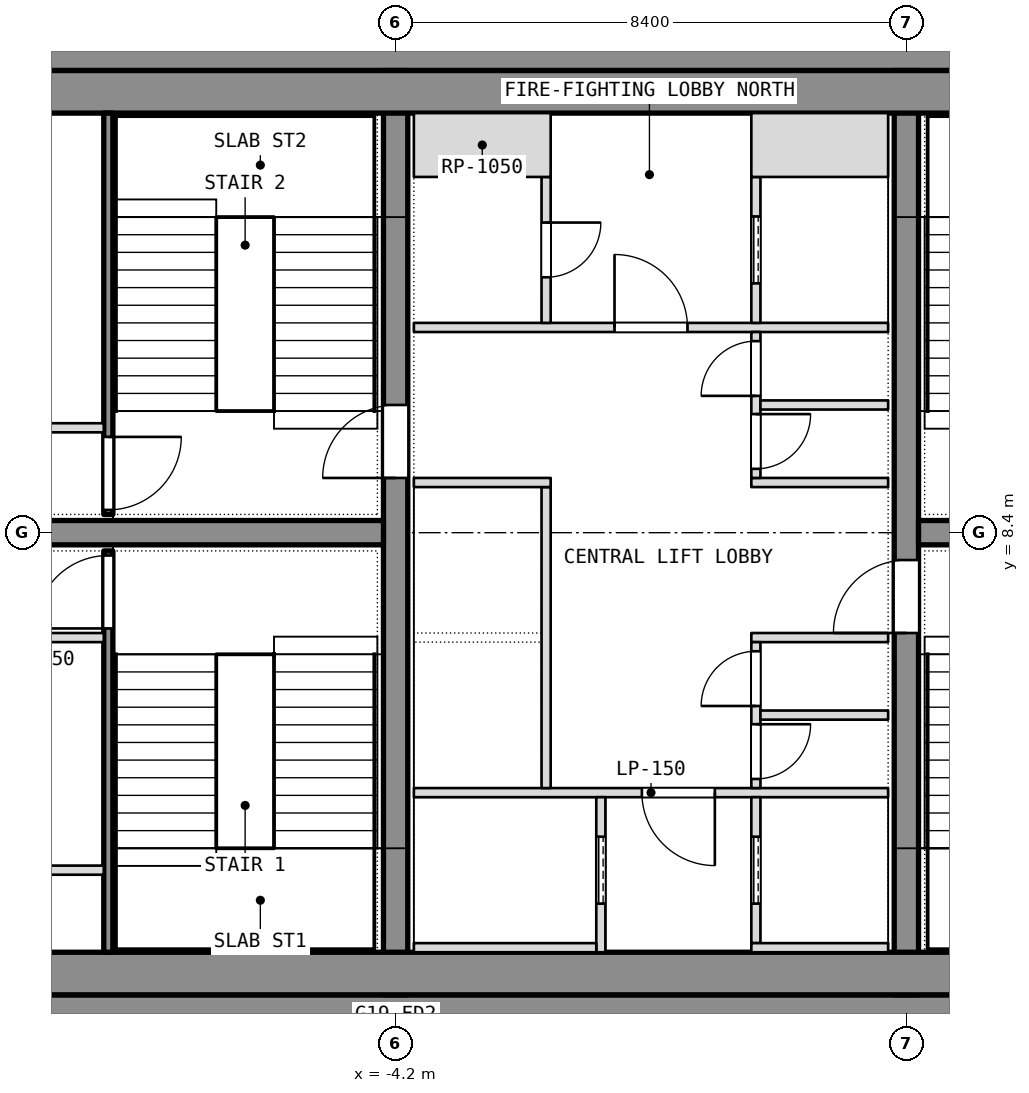
"""IFC4 building model, lengths in metres.
Left out: names, types, materials, properties, quantities, classifications, styles, units other than length and angle.
Written with IfcOpenShell. Run it as: python <this file> out.ifc"""

import sys

from ifc_helpers import new_model, si_unit, direction, frame, frame_2d, origin, place, context, subcontext, project, spatial, rectangle, extrude, element, fill, save


model = new_model("IFC4")
c1 = context("Model", 3, precision=1e-05, world=origin(), true_north=direction((0.0, 1.0)))
c2 = subcontext(c1, "Body", "Model", "MODEL_VIEW")
j1 = project(units=[si_unit("LENGTHUNIT", "METRE"), si_unit("PLANEANGLEUNIT", "RADIAN")], contexts=[c1])
p1 = place(None, origin())
s1 = spatial("IfcSite", under=j1, at=p1, CompositionType="ELEMENT")
p2 = place(p1, origin())
s2 = spatial("IfcBuilding", under=s1, at=p2, CompositionType="ELEMENT")
p3 = place(p2, frame((0.0, 0.0, 227.3)))
s3 = spatial("IfcBuildingStorey", under=s2, at=p3, CompositionType="ELEMENT", Elevation=227.3)
for number, where, z_axis, x_axis in (
    (1, (-11.1, 0.4, 0.0), (0.0, 0.0, 1.0), (1.0, 0.0, 0.0)),
    (2, (-11.1, 16.4, 0.0), (0.0, 0.0, 1.0), (1.0, 0.0, 0.0)),
):
    element("IfcWall", number, at=place(p3, frame(where, z_axis=z_axis, x_axis=x_axis)), inside=s3, PredefinedType="SHEAR", context=c2, shape_type="SweptSolid", body=[
        extrude(rectangle(XDim=22.2, YDim=0.8, at=frame_2d((11.1, 0.0))), origin(), (0.0, 0.0, 1.0), 3.6),
    ])
p4 = place(p3, frame((-4.2, 0.8, 0.0), z_axis=(0.0, 0.0, 1.0), x_axis=(0.0, 1.0, 0.0)))
e3 = element("IfcWall", 3, at=p4, inside=s3, PredefinedType="SHEAR", context=c2, shape_type="SweptSolid", body=[
    extrude(rectangle(XDim=15.2, YDim=0.4, at=frame_2d((7.6, 0.0))), origin(), (0.0, 0.0, 1.0), 3.6),
])
p5 = place(p4, frame((8.5, 0.0, 0.0)))
e4 = element("IfcOpeningElement", 4, at=p5, cuts=e3, PredefinedType="OPENING", context=c2, shape_type="SweptSolid", body=[
    extrude(rectangle(XDim=1.2, YDim=2.1, at=frame_2d((0.6, 1.05))), frame((0.0, 0.2, 0.0), z_axis=(0.0, -1.0, 0.0), x_axis=(1.0, 0.0, 0.0)), (0.0, 0.0, 1.0), 0.4),
])
p6 = place(p3, frame((4.2, 0.8, 0.0), z_axis=(0.0, 0.0, 1.0), x_axis=(0.0, 1.0, 0.0)))
e5 = element("IfcWall", 5, at=p6, inside=s3, PredefinedType="SHEAR", context=c2, shape_type="SweptSolid", body=[
    extrude(rectangle(XDim=15.2, YDim=0.4, at=frame_2d((7.6, 0.0))), origin(), (0.0, 0.0, 1.0), 3.6),
])
p7 = place(p6, frame((5.95, 0.0, 0.0)))
e6 = element("IfcOpeningElement", 6, at=p7, cuts=e5, PredefinedType="OPENING", context=c2, shape_type="SweptSolid", body=[
    extrude(rectangle(XDim=1.2, YDim=2.1, at=frame_2d((0.6, 1.05))), frame((0.0, 0.2, 0.0), z_axis=(0.0, -1.0, 0.0), x_axis=(1.0, 0.0, 0.0)), (0.0, 0.0, 1.0), 0.4),
])
for number, where, z_axis, x_axis in (
    (7, (-11.1, 8.4, 0.0), (0.0, 0.0, 1.0), (1.0, 0.0, 0.0)),
    (8, (4.4, 8.4, 0.0), (0.0, 0.0, 1.0), (1.0, 0.0, 0.0)),
):
    element("IfcWall", number, at=place(p3, frame(where, z_axis=z_axis, x_axis=x_axis)), inside=s3, PredefinedType="SHEAR", context=c2, shape_type="SweptSolid", body=[
        extrude(rectangle(XDim=6.7, YDim=0.4, at=frame_2d((3.35, 0.0))), origin(), (0.0, 0.0, 1.0), 3.6),
    ])
for number, where, z_axis, x_axis in (
    (9, (-11.1, 1.15, 0.0), (0.0, 0.0, 1.0), (1.0, 0.0, 0.0)),
    (10, (-11.1, 15.65, 0.0), (0.0, 0.0, 1.0), (1.0, 0.0, 0.0)),
):
    element("IfcWall", number, at=place(p3, frame(where, z_axis=z_axis, x_axis=x_axis)), inside=s3, PredefinedType="PARTITIONING", context=c2, shape_type="SweptSolid", body=[
        extrude(rectangle(XDim=22.2, YDim=0.7, at=frame_2d((11.1, 0.0))), origin(), (0.0, 0.0, 1.0), 3.34),
    ])
p8 = place(p3, frame((-8.925, 1.5, 0.0), z_axis=(0.0, 0.0, 1.0), x_axis=(0.0, 1.0, 0.0)))
e11 = element("IfcWall", 11, at=p8, inside=s3, PredefinedType="SHEAR", context=c2, shape_type="SweptSolid", body=[
    extrude(rectangle(XDim=6.6, YDim=0.15, at=frame_2d((3.3, 0.0))), origin(), (0.0, 0.0, 1.0), 3.34),
])
p9 = place(p8, frame((5.325, 0.0, 0.0)))
e12 = element("IfcOpeningElement", 12, at=p9, cuts=e11, PredefinedType="OPENING", context=c2, shape_type="SweptSolid", body=[
    extrude(rectangle(XDim=1.2, YDim=2.1, at=frame_2d((0.6, 1.05))), frame((0.0, 0.075, 0.0), z_axis=(0.0, -1.0, 0.0), x_axis=(1.0, 0.0, 0.0)), (0.0, 0.0, 1.0), 0.15),
])
for number, where, z_axis, x_axis in (
    (13, (-11.1, 6.675, 0.0), (0.0, 0.0, 1.0), (1.0, 0.0, 0.0)),
    (14, (-11.1, 2.85, 0.0), (0.0, 0.0, 1.0), (1.0, 0.0, 0.0)),
):
    element("IfcWall", number, at=place(p3, frame(where, z_axis=z_axis, x_axis=x_axis)), inside=s3, PredefinedType="PARTITIONING", context=c2, shape_type="SweptSolid", body=[
        extrude(rectangle(XDim=2.1, YDim=0.15, at=frame_2d((1.05, 0.0))), origin(), (0.0, 0.0, 1.0), 3.34),
    ])
p10 = place(p3, frame((-8.925, 8.7, 0.0), z_axis=(0.0, 0.0, 1.0), x_axis=(0.0, 1.0, 0.0)))
e15 = element("IfcWall", 15, at=p10, inside=s3, PredefinedType="SHEAR", context=c2, shape_type="SweptSolid", body=[
    extrude(rectangle(XDim=6.6, YDim=0.15, at=frame_2d((3.3, 0.0))), origin(), (0.0, 0.0, 1.0), 3.34),
])
p11 = place(p10, frame((0.075, 0.0, 0.0)))
e16 = element("IfcOpeningElement", 16, at=p11, cuts=e15, PredefinedType="OPENING", context=c2, shape_type="SweptSolid", body=[
    extrude(rectangle(XDim=1.2, YDim=2.1, at=frame_2d((0.6, 1.05))), frame((0.0, 0.075, 0.0), z_axis=(0.0, -1.0, 0.0), x_axis=(1.0, 0.0, 0.0)), (0.0, 0.0, 1.0), 0.15),
])
p12 = place(p3, frame((-11.1, 10.125, 0.0), z_axis=(0.0, 0.0, 1.0), x_axis=(1.0, 0.0, 0.0)))
e17 = element("IfcWall", 17, at=p12, inside=s3, PredefinedType="PARTITIONING", context=c2, shape_type="SweptSolid", body=[
    extrude(rectangle(XDim=2.1, YDim=0.15, at=frame_2d((1.05, 0.0))), origin(), (0.0, 0.0, 1.0), 3.34),
])
p13 = place(p3, frame((-3.9, 4.125, 0.0), z_axis=(0.0, 0.0, 1.0), x_axis=(1.0, 0.0, 0.0)))
e18 = element("IfcWall", 18, at=p13, inside=s3, PredefinedType="PARTITIONING", context=c2, shape_type="SweptSolid", body=[
    extrude(rectangle(XDim=7.8, YDim=0.15, at=frame_2d((3.9, 0.0))), origin(), (0.0, 0.0, 1.0), 3.34),
])
p14 = place(p13, frame((3.75, 0.0, 0.0)))
e19 = element("IfcOpeningElement", 19, at=p14, cuts=e18, PredefinedType="OPENING", context=c2, shape_type="SweptSolid", body=[
    extrude(rectangle(XDim=1.2, YDim=2.1, at=frame_2d((0.6, 1.05))), frame((0.0, 0.075, 0.0), z_axis=(0.0, -1.0, 0.0), x_axis=(1.0, 0.0, 0.0)), (0.0, 0.0, 1.0), 0.15),
])
p15 = place(p3, frame((-3.9, 11.775, 0.0), z_axis=(0.0, 0.0, 1.0), x_axis=(1.0, 0.0, 0.0)))
e20 = element("IfcWall", 20, at=p15, inside=s3, PredefinedType="PARTITIONING", context=c2, shape_type="SweptSolid", body=[
    extrude(rectangle(XDim=7.8, YDim=0.15, at=frame_2d((3.9, 0.0))), origin(), (0.0, 0.0, 1.0), 3.34),
])
p16 = place(p15, frame((3.3, 0.0, 0.0)))
e21 = element("IfcOpeningElement", 21, at=p16, cuts=e20, PredefinedType="OPENING", context=c2, shape_type="SweptSolid", body=[
    extrude(rectangle(XDim=1.2, YDim=2.1, at=frame_2d((0.6, 1.05))), frame((0.0, 0.075, 0.0), z_axis=(0.0, -1.0, 0.0), x_axis=(1.0, 0.0, 0.0)), (0.0, 0.0, 1.0), 0.15),
])
p17 = place(p3, frame((-0.825, 1.5, 0.0), z_axis=(0.0, 0.0, 1.0), x_axis=(0.0, 1.0, 0.0)))
e22 = element("IfcWall", 22, at=p17, inside=s3, PredefinedType="SHEAR", context=c2, shape_type="SweptSolid", body=[
    extrude(rectangle(XDim=2.55, YDim=0.15, at=frame_2d((1.275, 0.0))), origin(), (0.0, 0.0, 1.0), 3.6),
])
p18 = place(p17, frame((0.8, 0.0, 0.0)))
e23 = element("IfcOpeningElement", 23, at=p18, cuts=e22, PredefinedType="OPENING", context=c2, shape_type="SweptSolid", body=[
    extrude(rectangle(XDim=1.1, YDim=2.1, at=frame_2d((0.55, 1.05))), frame((0.0, 0.075, 0.0), z_axis=(0.0, -1.0, 0.0), x_axis=(1.0, 0.0, 0.0)), (0.0, 0.0, 1.0), 0.15),
])
p19 = place(p3, frame((-3.9, 1.575, 0.0), z_axis=(0.0, 0.0, 1.0), x_axis=(1.0, 0.0, 0.0)))
e24 = element("IfcWall", 24, at=p19, inside=s3, PredefinedType="SHEAR", context=c2, shape_type="SweptSolid", body=[
    extrude(rectangle(XDim=3.0, YDim=0.15, at=frame_2d((1.5, 0.0))), origin(), (0.0, 0.0, 1.0), 3.6),
])
p20 = place(p3, frame((-1.725, 4.2, 0.0), z_axis=(0.0, 0.0, 1.0), x_axis=(0.0, 1.0, 0.0)))
e25 = element("IfcWall", 25, at=p20, inside=s3, PredefinedType="SHEAR", context=c2, shape_type="SweptSolid", body=[
    extrude(rectangle(XDim=4.95, YDim=0.15, at=frame_2d((2.475, 0.0))), origin(), (0.0, 0.0, 1.0), 3.6),
])
p21 = place(p3, frame((-3.9, 9.225, 0.0), z_axis=(0.0, 0.0, 1.0), x_axis=(1.0, 0.0, 0.0)))
e26 = element("IfcWall", 26, at=p21, inside=s3, PredefinedType="SHEAR", context=c2, shape_type="SweptSolid", body=[
    extrude(rectangle(XDim=2.25, YDim=0.15, at=frame_2d((1.125, 0.0))), origin(), (0.0, 0.0, 1.0), 3.6),
])
p22 = place(p3, frame((-1.725, 11.85, 0.0), z_axis=(0.0, 0.0, 1.0), x_axis=(0.0, 1.0, 0.0)))
e27 = element("IfcWall", 27, at=p22, inside=s3, PredefinedType="PARTITIONING", context=c2, shape_type="SweptSolid", body=[
    extrude(rectangle(XDim=2.4, YDim=0.15, at=frame_2d((1.2, 0.0))), origin(), (0.0, 0.0, 1.0), 3.34),
])
p23 = place(p22, frame((0.75, 0.0, 0.0)))
e28 = element("IfcOpeningElement", 28, at=p23, cuts=e27, PredefinedType="OPENING", context=c2, shape_type="SweptSolid", body=[
    extrude(rectangle(XDim=0.9, YDim=2.1, at=frame_2d((0.45, 1.05))), frame((0.0, 0.075, 0.0), z_axis=(0.0, -1.0, 0.0), x_axis=(1.0, 0.0, 0.0)), (0.0, 0.0, 1.0), 0.15),
])
p24 = place(p3, frame((-3.9, 14.775, 0.0), z_axis=(0.0, 0.0, 1.0), x_axis=(1.0, 0.0, 0.0)))
e29 = element("IfcWall", 29, at=p24, inside=s3, PredefinedType="PARTITIONING", context=c2, shape_type="SweptSolid", body=[
    extrude(rectangle(XDim=2.25, YDim=1.05, at=frame_2d((1.125, 0.0))), origin(), (0.0, 0.0, 1.0), 3.34),
])
p25 = place(p3, frame((1.725, 1.65, 0.0), z_axis=(0.0, 0.0, 1.0), x_axis=(0.0, 1.0, 0.0)))
e30 = element("IfcWall", 30, at=p25, inside=s3, PredefinedType="SHEAR", context=c2, shape_type="SweptSolid", body=[
    extrude(rectangle(XDim=2.4, YDim=0.15, at=frame_2d((1.2, 0.0))), origin(), (0.0, 0.0, 1.0), 3.6),
])
p26 = place(p25, frame((0.65, 0.0, 0.0)))
e31 = element("IfcOpeningElement", 31, at=p26, cuts=e30, PredefinedType="OPENING", context=c2, shape_type="SweptSolid", body=[
    extrude(rectangle(XDim=1.1, YDim=2.1, at=frame_2d((0.55, 1.05))), frame((0.0, 0.075, 0.0), z_axis=(0.0, -1.0, 0.0), x_axis=(1.0, 0.0, 0.0)), (0.0, 0.0, 1.0), 0.15),
])
p27 = place(p3, frame((1.65, 1.575, 0.0), z_axis=(0.0, 0.0, 1.0), x_axis=(1.0, 0.0, 0.0)))
e32 = element("IfcWall", 32, at=p27, inside=s3, PredefinedType="SHEAR", context=c2, shape_type="SweptSolid", body=[
    extrude(rectangle(XDim=2.25, YDim=0.15, at=frame_2d((1.125, 0.0))), origin(), (0.0, 0.0, 1.0), 3.6),
])
p28 = place(p3, frame((1.725, 11.85, 0.0), z_axis=(0.0, 0.0, 1.0), x_axis=(0.0, 1.0, 0.0)))
e33 = element("IfcWall", 33, at=p28, inside=s3, PredefinedType="SHEAR", context=c2, shape_type="SweptSolid", body=[
    extrude(rectangle(XDim=2.4, YDim=0.15, at=frame_2d((1.2, 0.0))), origin(), (0.0, 0.0, 1.0), 3.6),
])
p29 = place(p28, frame((0.65, 0.0, 0.0)))
e34 = element("IfcOpeningElement", 34, at=p29, cuts=e33, PredefinedType="OPENING", context=c2, shape_type="SweptSolid", body=[
    extrude(rectangle(XDim=1.1, YDim=2.1, at=frame_2d((0.55, 1.05))), frame((0.0, 0.075, 0.0), z_axis=(0.0, -1.0, 0.0), x_axis=(1.0, 0.0, 0.0)), (0.0, 0.0, 1.0), 0.15),
])
p30 = place(p3, frame((1.65, 14.775, 0.0), z_axis=(0.0, 0.0, 1.0), x_axis=(1.0, 0.0, 0.0)))
e35 = element("IfcWall", 35, at=p30, inside=s3, PredefinedType="SHEAR", context=c2, shape_type="SweptSolid", body=[
    extrude(rectangle(XDim=2.25, YDim=1.05, at=frame_2d((1.125, 0.0))), origin(), (0.0, 0.0, 1.0), 3.6),
])
for number, where, z_axis, x_axis in (
    (36, (1.65, 6.675, 0.0), (0.0, 0.0, 1.0), (1.0, 0.0, 0.0)),
    (37, (1.65, 9.225, 0.0), (0.0, 0.0, 1.0), (1.0, 0.0, 0.0)),
):
    element("IfcWall", number, at=place(p3, frame(where, z_axis=z_axis, x_axis=x_axis)), inside=s3, PredefinedType="PARTITIONING", context=c2, shape_type="SweptSolid", body=[
        extrude(rectangle(XDim=2.25, YDim=0.15, at=frame_2d((1.125, 0.0))), origin(), (0.0, 0.0, 1.0), 3.34),
    ])
p31 = place(p3, frame((1.725, 4.2, 0.0), z_axis=(0.0, 0.0, 1.0), x_axis=(0.0, 1.0, 0.0)))
e38 = element("IfcWall", 38, at=p31, inside=s3, PredefinedType="PARTITIONING", context=c2, shape_type="SweptSolid", body=[
    extrude(rectangle(XDim=2.4, YDim=0.15, at=frame_2d((1.2, 0.0))), origin(), (0.0, 0.0, 1.0), 3.34),
])
p32 = place(p31, frame((0.15, 0.0, 0.0)))
e39 = element("IfcOpeningElement", 39, at=p32, cuts=e38, PredefinedType="OPENING", context=c2, shape_type="SweptSolid", body=[
    extrude(rectangle(XDim=0.9, YDim=2.1, at=frame_2d((0.45, 1.05))), frame((0.0, 0.075, 0.0), z_axis=(0.0, -1.0, 0.0), x_axis=(1.0, 0.0, 0.0)), (0.0, 0.0, 1.0), 0.15),
])
p33 = place(p31, frame((1.35, 0.0, 0.0)))
e40 = element("IfcOpeningElement", 40, at=p33, cuts=e38, PredefinedType="OPENING", context=c2, shape_type="SweptSolid", body=[
    extrude(rectangle(XDim=0.9, YDim=2.1, at=frame_2d((0.45, 1.05))), frame((0.0, 0.075, 0.0), z_axis=(0.0, -1.0, 0.0), x_axis=(1.0, 0.0, 0.0)), (0.0, 0.0, 1.0), 0.15),
])
p34 = place(p3, frame((1.725, 9.3, 0.0), z_axis=(0.0, 0.0, 1.0), x_axis=(0.0, 1.0, 0.0)))
e41 = element("IfcWall", 41, at=p34, inside=s3, PredefinedType="PARTITIONING", context=c2, shape_type="SweptSolid", body=[
    extrude(rectangle(XDim=2.4, YDim=0.15, at=frame_2d((1.2, 0.0))), origin(), (0.0, 0.0, 1.0), 3.34),
])
p35 = place(p34, frame((0.15, 0.0, 0.0)))
e42 = element("IfcOpeningElement", 42, at=p35, cuts=e41, PredefinedType="OPENING", context=c2, shape_type="SweptSolid", body=[
    extrude(rectangle(XDim=0.9, YDim=2.1, at=frame_2d((0.45, 1.05))), frame((0.0, 0.075, 0.0), z_axis=(0.0, -1.0, 0.0), x_axis=(1.0, 0.0, 0.0)), (0.0, 0.0, 1.0), 0.15),
])
p36 = place(p34, frame((1.35, 0.0, 0.0)))
e43 = element("IfcOpeningElement", 43, at=p36, cuts=e41, PredefinedType="OPENING", context=c2, shape_type="SweptSolid", body=[
    extrude(rectangle(XDim=0.9, YDim=2.1, at=frame_2d((0.45, 1.05))), frame((0.0, 0.075, 0.0), z_axis=(0.0, -1.0, 0.0), x_axis=(1.0, 0.0, 0.0)), (0.0, 0.0, 1.0), 0.15),
])
for number, where, z_axis, x_axis in (
    (44, (1.8, 5.4, 0.0), (0.0, 0.0, 1.0), (1.0, 0.0, 0.0)),
    (45, (1.8, 10.5, 0.0), (0.0, 0.0, 1.0), (1.0, 0.0, 0.0)),
):
    element("IfcWall", number, at=place(p3, frame(where, z_axis=z_axis, x_axis=x_axis)), inside=s3, PredefinedType="PARTITIONING", context=c2, shape_type="SweptSolid", body=[
        extrude(rectangle(XDim=2.1, YDim=0.15, at=frame_2d((1.05, 0.0))), origin(), (0.0, 0.0, 1.0), 3.34),
    ])
p37 = place(p9, origin())
e46 = element("IfcDoor", 46, at=p37, inside=s3, OperationType="SINGLE_SWING_LEFT", PredefinedType="DOOR", context=c2, shape_type="SweptSolid", body=[
    extrude(rectangle(XDim=1.2, YDim=2.1, at=frame_2d((0.6, 1.05))), frame((0.0, 0.025, 0.0), z_axis=(0.0, -1.0, 0.0), x_axis=(1.0, 0.0, 0.0)), (0.0, 0.0, 1.0), 0.05),
])
fill(e12, e46)
p38 = place(p11, origin())
e47 = element("IfcDoor", 47, at=p38, inside=s3, OperationType="SINGLE_SWING_LEFT", PredefinedType="DOOR", context=c2, shape_type="SweptSolid", body=[
    extrude(rectangle(XDim=1.2, YDim=2.1, at=frame_2d((0.6, 1.05))), frame((0.0, 0.025, 0.0), z_axis=(0.0, -1.0, 0.0), x_axis=(1.0, 0.0, 0.0)), (0.0, 0.0, 1.0), 0.05),
])
fill(e16, e47)
p39 = place(p32, origin())
e48 = element("IfcDoor", 48, at=p39, inside=s3, OperationType="SINGLE_SWING_LEFT", PredefinedType="DOOR", context=c2, shape_type="SweptSolid", body=[
    extrude(rectangle(XDim=0.9, YDim=2.1, at=frame_2d((0.45, 1.05))), frame((0.0, 0.025, 0.0), z_axis=(0.0, -1.0, 0.0), x_axis=(1.0, 0.0, 0.0)), (0.0, 0.0, 1.0), 0.05),
])
fill(e39, e48)
p40 = place(p33, origin())
e49 = element("IfcDoor", 49, at=p40, inside=s3, OperationType="SINGLE_SWING_LEFT", PredefinedType="DOOR", context=c2, shape_type="SweptSolid", body=[
    extrude(rectangle(XDim=0.9, YDim=2.1, at=frame_2d((0.45, 1.05))), frame((0.0, 0.025, 0.0), z_axis=(0.0, -1.0, 0.0), x_axis=(1.0, 0.0, 0.0)), (0.0, 0.0, 1.0), 0.05),
])
fill(e40, e49)
p41 = place(p35, origin())
e50 = element("IfcDoor", 50, at=p41, inside=s3, OperationType="SINGLE_SWING_LEFT", PredefinedType="DOOR", context=c2, shape_type="SweptSolid", body=[
    extrude(rectangle(XDim=0.9, YDim=2.1, at=frame_2d((0.45, 1.05))), frame((0.0, 0.025, 0.0), z_axis=(0.0, -1.0, 0.0), x_axis=(1.0, 0.0, 0.0)), (0.0, 0.0, 1.0), 0.05),
])
fill(e42, e50)
p42 = place(p36, origin())
e51 = element("IfcDoor", 51, at=p42, inside=s3, OperationType="SINGLE_SWING_LEFT", PredefinedType="DOOR", context=c2, shape_type="SweptSolid", body=[
    extrude(rectangle(XDim=0.9, YDim=2.1, at=frame_2d((0.45, 1.05))), frame((0.0, 0.025, 0.0), z_axis=(0.0, -1.0, 0.0), x_axis=(1.0, 0.0, 0.0)), (0.0, 0.0, 1.0), 0.05),
])
fill(e43, e51)
p43 = place(p18, origin())
e52 = element("IfcDoor", 52, at=p43, inside=s3, OperationType="SLIDING_TO_LEFT", PredefinedType="DOOR", context=c2, shape_type="SweptSolid", body=[
    extrude(rectangle(XDim=1.1, YDim=2.1, at=frame_2d((0.55, 1.05))), frame((0.0, 0.025, 0.0), z_axis=(0.0, -1.0, 0.0), x_axis=(1.0, 0.0, 0.0)), (0.0, 0.0, 1.0), 0.05),
])
fill(e23, e52)
p44 = place(p26, origin())
e53 = element("IfcDoor", 53, at=p44, inside=s3, OperationType="SLIDING_TO_LEFT", PredefinedType="DOOR", context=c2, shape_type="SweptSolid", body=[
    extrude(rectangle(XDim=1.1, YDim=2.1, at=frame_2d((0.55, 1.05))), frame((0.0, 0.025, 0.0), z_axis=(0.0, -1.0, 0.0), x_axis=(1.0, 0.0, 0.0)), (0.0, 0.0, 1.0), 0.05),
])
fill(e31, e53)
p45 = place(p29, origin())
e54 = element("IfcDoor", 54, at=p45, inside=s3, OperationType="SLIDING_TO_LEFT", PredefinedType="DOOR", context=c2, shape_type="SweptSolid", body=[
    extrude(rectangle(XDim=1.1, YDim=2.1, at=frame_2d((0.55, 1.05))), frame((0.0, 0.025, 0.0), z_axis=(0.0, -1.0, 0.0), x_axis=(1.0, 0.0, 0.0)), (0.0, 0.0, 1.0), 0.05),
])
fill(e34, e54)
p46 = place(p14, origin())
e55 = element("IfcDoor", 55, at=p46, inside=s3, OperationType="SINGLE_SWING_LEFT", PredefinedType="DOOR", context=c2, shape_type="SweptSolid", body=[
    extrude(rectangle(XDim=1.2, YDim=2.1, at=frame_2d((0.6, 1.05))), frame((0.0, 0.025, 0.0), z_axis=(0.0, -1.0, 0.0), x_axis=(1.0, 0.0, 0.0)), (0.0, 0.0, 1.0), 0.05),
])
fill(e19, e55)
p47 = place(p16, origin())
e56 = element("IfcDoor", 56, at=p47, inside=s3, OperationType="SINGLE_SWING_LEFT", PredefinedType="DOOR", context=c2, shape_type="SweptSolid", body=[
    extrude(rectangle(XDim=1.2, YDim=2.1, at=frame_2d((0.6, 1.05))), frame((0.0, 0.025, 0.0), z_axis=(0.0, -1.0, 0.0), x_axis=(1.0, 0.0, 0.0)), (0.0, 0.0, 1.0), 0.05),
])
fill(e21, e56)
p48 = place(p23, origin())
e57 = element("IfcDoor", 57, at=p48, inside=s3, OperationType="SINGLE_SWING_LEFT", PredefinedType="DOOR", context=c2, shape_type="SweptSolid", body=[
    extrude(rectangle(XDim=0.9, YDim=2.1, at=frame_2d((0.45, 1.05))), frame((0.0, 0.025, 0.0), z_axis=(0.0, -1.0, 0.0), x_axis=(1.0, 0.0, 0.0)), (0.0, 0.0, 1.0), 0.05),
])
fill(e28, e57)
p49 = place(p5, origin())
e58 = element("IfcDoor", 58, at=p49, inside=s3, OperationType="SINGLE_SWING_LEFT", PredefinedType="DOOR", context=c2, shape_type="SweptSolid", body=[
    extrude(rectangle(XDim=1.2, YDim=2.1, at=frame_2d((0.6, 1.05))), frame((0.0, 0.025, 0.0), z_axis=(0.0, -1.0, 0.0), x_axis=(1.0, 0.0, 0.0)), (0.0, 0.0, 1.0), 0.05),
])
fill(e4, e58)
p50 = place(p7, origin())
e59 = element("IfcDoor", 59, at=p50, inside=s3, OperationType="SINGLE_SWING_LEFT", PredefinedType="DOOR", context=c2, shape_type="SweptSolid", body=[
    extrude(rectangle(XDim=1.2, YDim=2.1, at=frame_2d((0.6, 1.05))), frame((0.0, 0.025, 0.0), z_axis=(0.0, -1.0, 0.0), x_axis=(1.0, 0.0, 0.0)), (0.0, 0.0, 1.0), 0.05),
])
fill(e6, e59)
save(model, sys.argv[1])
